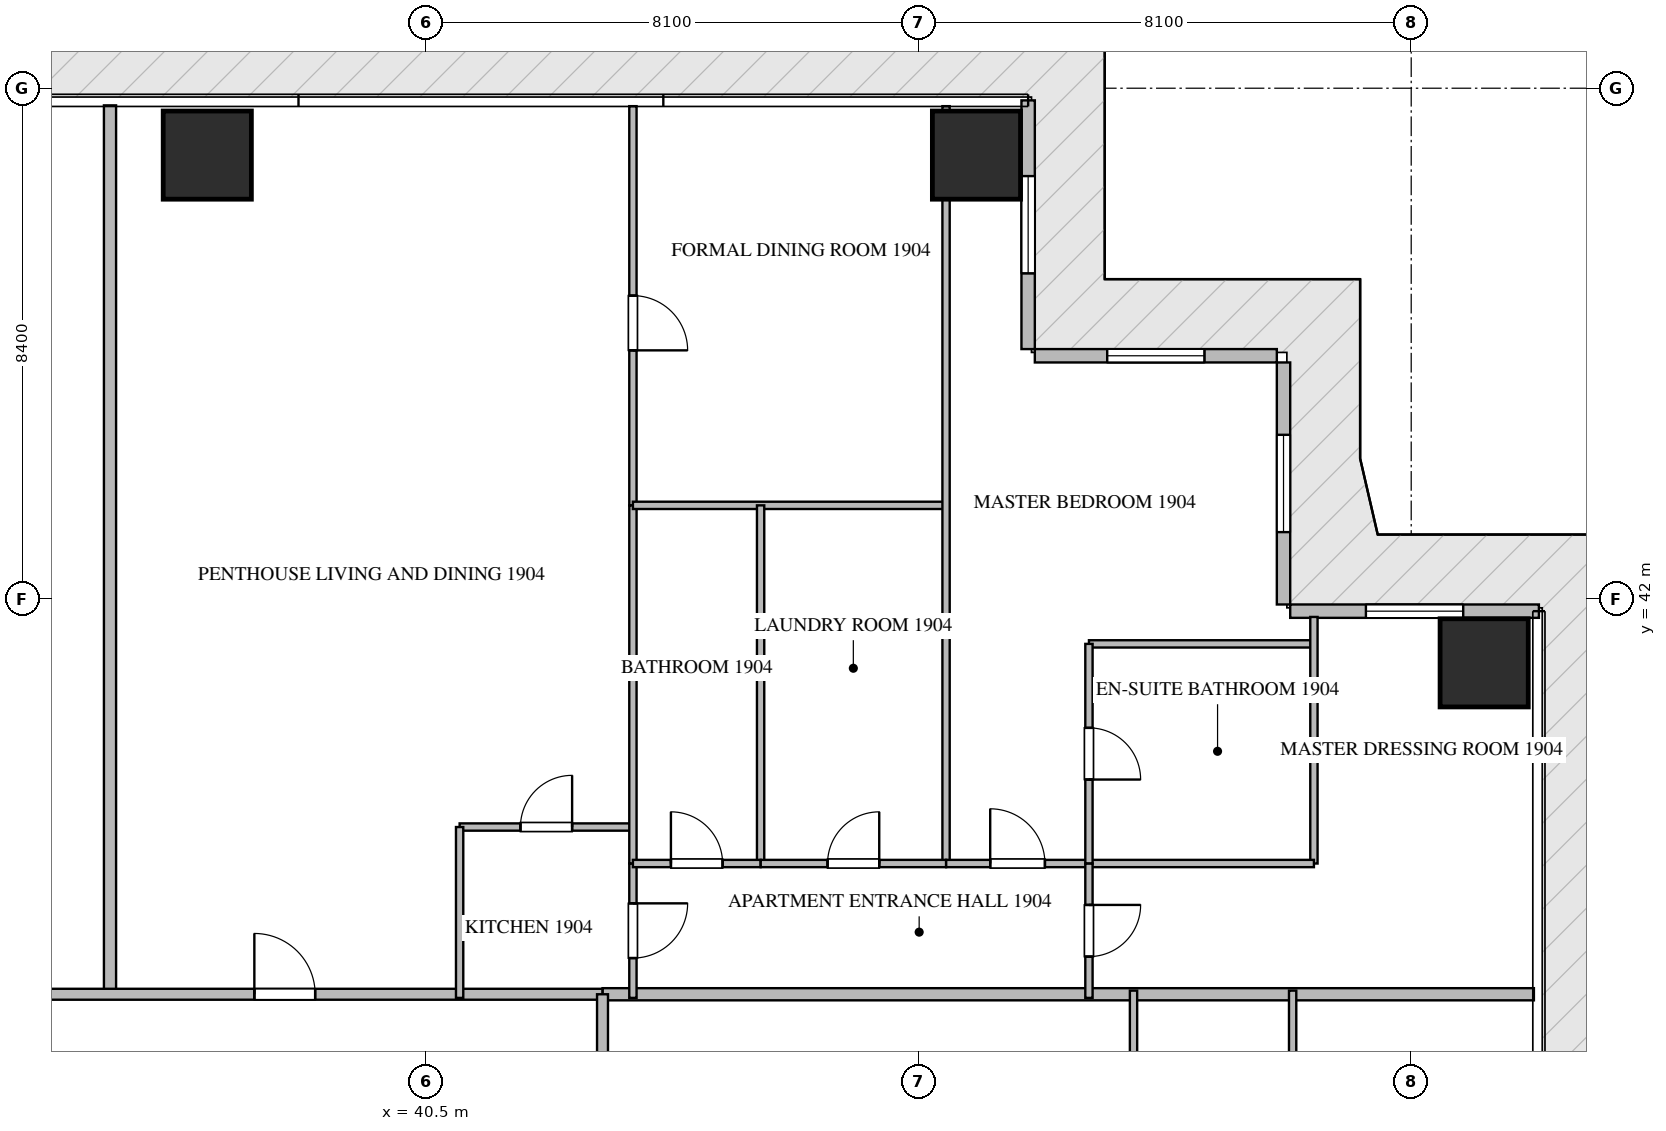
"""IFC4 building model, lengths in metres.
Left out: names, types, materials, properties, quantities, classifications, styles, units other than length and angle.
Written with IfcOpenShell. Run it as: python <this file> out.ifc"""

import sys

from ifc_helpers import new_model, si_unit, direction, frame, frame_2d, origin, origin_2d, place, context, subcontext, project, spatial, rectangle, extrude, source, transform, mapped, element, fill, save


model = new_model("IFC4")
c1 = context("Model", 3, precision=1e-05, world=origin(), true_north=direction((0.0, 1.0)))
c2 = subcontext(c1, "Body", "Model", "MODEL_VIEW")
j1 = project(units=[si_unit("LENGTHUNIT", "METRE"), si_unit("PLANEANGLEUNIT", "RADIAN")], contexts=[c1])
p1 = place(None, origin())
s1 = spatial("IfcSite", under=j1, at=p1, CompositionType="ELEMENT")
p2 = place(p1, origin())
s2 = spatial("IfcBuilding", under=s1, at=p2, CompositionType="ELEMENT")
p3 = place(p2, frame((0.0, 0.0, 79.2)))
s3 = spatial("IfcBuildingStorey", under=s2, at=p3, CompositionType="ELEMENT", Elevation=79.2)
m1 = source(origin(), c2, "Body", "SweptSolid", [
    extrude(rectangle(XDim=1.45, YDim=1.45, at=origin_2d()), origin(), (0.0, 0.0, 1.0), 3.75),
])
for number, where, z_axis, x_axis in (
    (1, (36.9, 49.3, -0.26), (0.0, 0.0, 1.0), (1.0, 0.0, 0.0)),
    (2, (49.55, 49.3, -0.26), (0.0, 0.0, 1.0), (1.0, 0.0, 0.0)),
    (3, (57.9, 40.95, -0.26), (0.0, 0.0, 1.0), (1.0, 0.0, 0.0)),
):
    element("IfcColumn", number, at=place(p3, frame(where, z_axis=z_axis, x_axis=x_axis)), inside=s3, PredefinedType="COLUMN", context=c2, shape_type="MappedRepresentation", body=[
        mapped(m1, transform((0.0, 0.0, 0.0), scale=1.0)),
    ])
p4 = place(p3, frame((58.8, 41.8, 0.0), z_axis=(0.0, 0.0, 1.0), x_axis=(-1.0, 0.0, 0.0)))
e4 = element("IfcWall", 4, at=p4, inside=s3, PredefinedType="ELEMENTEDWALL", context=c2, shape_type="SweptSolid", body=[
    extrude(rectangle(XDim=4.09, YDim=0.22, at=frame_2d((2.045, 0.0))), origin(), (0.0, 0.0, 1.0), 3.475),
])
p5 = place(p4, frame((1.245, 0.0, 0.65)))
e5 = element("IfcOpeningElement", 5, at=p5, cuts=e4, PredefinedType="OPENING", context=c2, shape_type="SweptSolid", body=[
    extrude(rectangle(XDim=1.6, YDim=2.1, at=frame_2d((0.8, 1.05))), frame((0.0, 0.12, 0.0), z_axis=(0.0, -1.0, 0.0), x_axis=(1.0, 0.0, 0.0)), (0.0, 0.0, 1.0), 0.24),
])
p6 = place(p3, frame((54.6, 41.91, 0.0), z_axis=(0.0, 0.0, 1.0), x_axis=(0.0, 1.0, 0.0)))
e6 = element("IfcWall", 6, at=p6, inside=s3, PredefinedType="ELEMENTEDWALL", context=c2, shape_type="SweptSolid", body=[
    extrude(rectangle(XDim=3.98, YDim=0.22, at=frame_2d((1.99, 0.0))), origin(), (0.0, 0.0, 1.0), 3.475),
])
p7 = place(p6, frame((1.19, 0.0, 0.65)))
e7 = element("IfcOpeningElement", 7, at=p7, cuts=e6, PredefinedType="OPENING", context=c2, shape_type="SweptSolid", body=[
    extrude(rectangle(XDim=1.6, YDim=2.1, at=frame_2d((0.8, 1.05))), frame((0.0, 0.12, 0.0), z_axis=(0.0, -1.0, 0.0), x_axis=(1.0, 0.0, 0.0)), (0.0, 0.0, 1.0), 0.24),
])
p8 = place(p3, frame((54.49, 46.0, 0.0), z_axis=(0.0, 0.0, 1.0), x_axis=(-1.0, 0.0, 0.0)))
e8 = element("IfcWall", 8, at=p8, inside=s3, PredefinedType="ELEMENTEDWALL", context=c2, shape_type="SweptSolid", body=[
    extrude(rectangle(XDim=3.98, YDim=0.22, at=frame_2d((1.99, 0.0))), origin(), (0.0, 0.0, 1.0), 3.475),
])
p9 = place(p8, frame((1.19, 0.0, 0.65)))
e9 = element("IfcOpeningElement", 9, at=p9, cuts=e8, PredefinedType="OPENING", context=c2, shape_type="SweptSolid", body=[
    extrude(rectangle(XDim=1.6, YDim=2.1, at=frame_2d((0.8, 1.05))), frame((0.0, 0.12, 0.0), z_axis=(0.0, -1.0, 0.0), x_axis=(1.0, 0.0, 0.0)), (0.0, 0.0, 1.0), 0.24),
])
p10 = place(p3, frame((50.4, 46.11, 0.0), z_axis=(0.0, 0.0, 1.0), x_axis=(0.0, 1.0, 0.0)))
e10 = element("IfcWall", 10, at=p10, inside=s3, PredefinedType="ELEMENTEDWALL", context=c2, shape_type="SweptSolid", body=[
    extrude(rectangle(XDim=4.09, YDim=0.22, at=frame_2d((2.045, 0.0))), origin(), (0.0, 0.0, 1.0), 3.475),
])
p11 = place(p10, frame((1.245, 0.0, 0.65)))
e11 = element("IfcOpeningElement", 11, at=p11, cuts=e10, PredefinedType="OPENING", context=c2, shape_type="SweptSolid", body=[
    extrude(rectangle(XDim=1.6, YDim=2.1, at=frame_2d((0.8, 1.05))), frame((0.0, 0.12, 0.0), z_axis=(0.0, -1.0, 0.0), x_axis=(1.0, 0.0, 0.0)), (0.0, 0.0, 1.0), 0.24),
])
p12 = place(p3, frame((35.3, 35.5, 0.0), z_axis=(0.0, 0.0, 1.0), x_axis=(0.0, 1.0, 0.0)))
e12 = element("IfcWall", 12, at=p12, inside=s3, PredefinedType="PARTITIONING", context=c2, shape_type="SweptSolid", body=[
    extrude(rectangle(XDim=14.618, YDim=0.2, at=frame_2d((7.309, 0.0))), origin(), (0.0, 0.0, 1.0), 3.49),
])
p13 = place(p3, frame((43.4, 35.5, 0.0), z_axis=(0.0, 0.0, 1.0), x_axis=(1.0, 0.0, 0.0)))
e13 = element("IfcWall", 13, at=p13, inside=s3, PredefinedType="PARTITIONING", context=c2, shape_type="SweptSolid", body=[
    extrude(rectangle(XDim=15.318, YDim=0.2, at=frame_2d((7.659, 0.0))), origin(), (0.0, 0.0, 1.0), 3.49),
])
p14 = place(p3, frame((21.402, 35.5, 0.0), z_axis=(0.0, 0.0, 1.0), x_axis=(1.0, 0.0, 0.0)))
e14 = element("IfcWall", 14, at=p14, inside=s3, PredefinedType="PARTITIONING", context=c2, shape_type="SweptSolid", body=[
    extrude(rectangle(XDim=21.996, YDim=0.18, at=frame_2d((10.998, 0.0))), origin(), (0.0, 0.0, 1.0), 3.49),
])
p15 = place(p14, frame((10.498, 0.0, 0.0)))
e15 = element("IfcOpeningElement", 15, at=p15, cuts=e14, PredefinedType="OPENING", context=c2, shape_type="SweptSolid", body=[
    extrude(rectangle(XDim=1.0, YDim=2.15, at=frame_2d((0.5, 1.075))), frame((0.0, 0.1, 0.0), z_axis=(0.0, -1.0, 0.0), x_axis=(1.0, 0.0, 0.0)), (0.0, 0.0, 1.0), 0.2),
])
p16 = place(p14, frame((16.272, 0.0, 0.0)))
e16 = element("IfcOpeningElement", 16, at=p16, cuts=e14, PredefinedType="OPENING", context=c2, shape_type="SweptSolid", body=[
    extrude(rectangle(XDim=1.0, YDim=2.15, at=frame_2d((0.5, 1.075))), frame((0.0, 0.1, 0.0), z_axis=(0.0, -1.0, 0.0), x_axis=(1.0, 0.0, 0.0)), (0.0, 0.0, 1.0), 0.2),
])
p17 = place(p3, frame((43.4, 14.9, 0.0), z_axis=(0.0, 0.0, 1.0), x_axis=(0.0, 1.0, 0.0)))
e17 = element("IfcWall", 17, at=p17, inside=s3, PredefinedType="PARTITIONING", context=c2, shape_type="SweptSolid", body=[
    extrude(rectangle(XDim=20.6, YDim=0.18, at=frame_2d((10.3, 0.0))), origin(), (0.0, 0.0, 1.0), 3.49),
])
p18 = place(p17, frame((1.96, 0.0, 0.0)))
e18 = element("IfcOpeningElement", 18, at=p18, cuts=e17, PredefinedType="OPENING", context=c2, shape_type="SweptSolid", body=[
    extrude(rectangle(XDim=1.0, YDim=2.15, at=frame_2d((0.5, 1.075))), frame((0.0, 0.1, 0.0), z_axis=(0.0, -1.0, 0.0), x_axis=(1.0, 0.0, 0.0)), (0.0, 0.0, 1.0), 0.2),
])
p19 = place(p3, frame((41.05, 38.25, 0.0), z_axis=(0.0, 0.0, 1.0), x_axis=(1.0, 0.0, 0.0)))
e19 = element("IfcWall", 19, at=p19, inside=s3, PredefinedType="PARTITIONING", context=c2, shape_type="SweptSolid", body=[
    extrude(rectangle(XDim=2.85, YDim=0.12, at=frame_2d((1.425, 0.0))), origin(), (0.0, 0.0, 1.0), 3.49),
])
p20 = place(p19, frame((1.0, 0.0, 0.0)))
e20 = element("IfcOpeningElement", 20, at=p20, cuts=e19, PredefinedType="OPENING", context=c2, shape_type="SweptSolid", body=[
    extrude(rectangle(XDim=0.85, YDim=2.1, at=frame_2d((0.425, 1.05))), frame((0.0, 0.07, 0.0), z_axis=(0.0, -1.0, 0.0), x_axis=(1.0, 0.0, 0.0)), (0.0, 0.0, 1.0), 0.14),
])
p21 = place(p3, frame((41.05, 38.25, 0.0), z_axis=(0.0, 0.0, 1.0), x_axis=(0.0, -1.0, 0.0)))
e21 = element("IfcWall", 21, at=p21, inside=s3, PredefinedType="PARTITIONING", context=c2, shape_type="SweptSolid", body=[
    extrude(rectangle(XDim=2.81, YDim=0.12, at=frame_2d((1.405, 0.0))), origin(), (0.0, 0.0, 1.0), 3.49),
])
p22 = place(p3, frame((43.9, 37.65, 0.0), z_axis=(0.0, 0.0, 1.0), x_axis=(0.0, -1.0, 0.0)))
e22 = element("IfcWall", 22, at=p22, inside=s3, PredefinedType="PARTITIONING", context=c2, shape_type="SweptSolid", body=[
    extrude(rectangle(XDim=2.21, YDim=0.12, at=frame_2d((1.105, 0.0))), origin(), (0.0, 0.0, 1.0), 3.49),
])
p23 = place(p22, frame((0.655, 0.0, 0.0)))
e23 = element("IfcOpeningElement", 23, at=p23, cuts=e22, PredefinedType="OPENING", context=c2, shape_type="SweptSolid", body=[
    extrude(rectangle(XDim=0.9, YDim=2.1, at=frame_2d((0.45, 1.05))), frame((0.0, 0.07, 0.0), z_axis=(0.0, -1.0, 0.0), x_axis=(1.0, 0.0, 0.0)), (0.0, 0.0, 1.0), 0.14),
])
p24 = place(p3, frame((43.9, 50.105, 0.0), z_axis=(0.0, 0.0, 1.0), x_axis=(0.0, -1.0, 0.0)))
e24 = element("IfcWall", 24, at=p24, inside=s3, PredefinedType="PARTITIONING", context=c2, shape_type="SweptSolid", body=[
    extrude(rectangle(XDim=6.565, YDim=0.12, at=frame_2d((3.282, 0.0))), origin(), (0.0, 0.0, 1.0), 3.49),
])
p25 = place(p24, frame((3.116, 0.0, 0.0)))
e25 = element("IfcOpeningElement", 25, at=p25, cuts=e24, PredefinedType="OPENING", context=c2, shape_type="SweptSolid", body=[
    extrude(rectangle(XDim=0.9, YDim=2.1, at=frame_2d((0.45, 1.05))), frame((0.0, 0.07, 0.0), z_axis=(0.0, -1.0, 0.0), x_axis=(1.0, 0.0, 0.0)), (0.0, 0.0, 1.0), 0.14),
])
p26 = place(p3, frame((43.9, 43.538, 0.0), z_axis=(0.0, 0.0, 1.0), x_axis=(0.0, -1.0, 0.0)))
e26 = element("IfcWall", 26, at=p26, inside=s3, PredefinedType="PARTITIONING", context=c2, shape_type="SweptSolid", body=[
    extrude(rectangle(XDim=5.886, YDim=0.12, at=frame_2d((2.943, 0.0))), origin(), (0.0, 0.0, 1.0), 3.49),
])
p27 = place(p3, frame((43.9, 43.54, 0.0), z_axis=(0.0, 0.0, 1.0), x_axis=(1.0, 0.0, 0.0)))
e27 = element("IfcWall", 27, at=p27, inside=s3, PredefinedType="PARTITIONING", context=c2, shape_type="SweptSolid", body=[
    extrude(rectangle(XDim=5.15, YDim=0.12, at=frame_2d((2.575, 0.0))), origin(), (0.0, 0.0, 1.0), 3.49),
])
p28 = place(p3, frame((49.05, 50.105, 0.0), z_axis=(0.0, 0.0, 1.0), x_axis=(0.0, -1.0, 0.0)))
e28 = element("IfcWall", 28, at=p28, inside=s3, PredefinedType="PARTITIONING", context=c2, shape_type="SweptSolid", body=[
    extrude(rectangle(XDim=12.455, YDim=0.12, at=frame_2d((6.228, 0.0))), origin(), (0.0, 0.0, 1.0), 3.49),
])
p29 = place(p3, frame((46.0, 43.54, 0.0), z_axis=(0.0, 0.0, 1.0), x_axis=(0.0, -1.0, 0.0)))
e29 = element("IfcWall", 29, at=p29, inside=s3, PredefinedType="PARTITIONING", context=c2, shape_type="SweptSolid", body=[
    extrude(rectangle(XDim=5.89, YDim=0.12, at=frame_2d((2.945, 0.0))), origin(), (0.0, 0.0, 1.0), 3.49),
])
p30 = place(p3, frame((43.9, 37.65, 0.0), z_axis=(0.0, 0.0, 1.0), x_axis=(1.0, 0.0, 0.0)))
e30 = element("IfcWall", 30, at=p30, inside=s3, PredefinedType="PARTITIONING", context=c2, shape_type="SweptSolid", body=[
    extrude(rectangle(XDim=2.1, YDim=0.12, at=frame_2d((1.05, 0.0))), origin(), (0.0, 0.0, 1.0), 3.49),
])
p31 = place(p30, frame((0.625, 0.0, 0.0)))
e31 = element("IfcOpeningElement", 31, at=p31, cuts=e30, PredefinedType="OPENING", context=c2, shape_type="SweptSolid", body=[
    extrude(rectangle(XDim=0.85, YDim=2.1, at=frame_2d((0.425, 1.05))), frame((0.0, 0.07, 0.0), z_axis=(0.0, -1.0, 0.0), x_axis=(1.0, 0.0, 0.0)), (0.0, 0.0, 1.0), 0.14),
])
p32 = place(p3, frame((46.002, 37.65, 0.0), z_axis=(0.0, 0.0, 1.0), x_axis=(1.0, 0.0, 0.0)))
e32 = element("IfcWall", 32, at=p32, inside=s3, PredefinedType="PARTITIONING", context=c2, shape_type="SweptSolid", body=[
    extrude(rectangle(XDim=3.048, YDim=0.12, at=frame_2d((1.524, 0.0))), origin(), (0.0, 0.0, 1.0), 3.49),
])
p33 = place(p32, frame((1.099, 0.0, 0.0)))
e33 = element("IfcOpeningElement", 33, at=p33, cuts=e32, PredefinedType="OPENING", context=c2, shape_type="SweptSolid", body=[
    extrude(rectangle(XDim=0.85, YDim=2.1, at=frame_2d((0.425, 1.05))), frame((0.0, 0.07, 0.0), z_axis=(0.0, -1.0, 0.0), x_axis=(1.0, 0.0, 0.0)), (0.0, 0.0, 1.0), 0.14),
])
p34 = place(p3, frame((49.052, 37.65, 0.0), z_axis=(0.0, 0.0, 1.0), x_axis=(1.0, 0.0, 0.0)))
e34 = element("IfcWall", 34, at=p34, inside=s3, PredefinedType="PARTITIONING", context=c2, shape_type="SweptSolid", body=[
    extrude(rectangle(XDim=2.348, YDim=0.12, at=frame_2d((1.174, 0.0))), origin(), (0.0, 0.0, 1.0), 3.49),
])
p35 = place(p34, frame((0.724, 0.0, 0.0)))
e35 = element("IfcOpeningElement", 35, at=p35, cuts=e34, PredefinedType="OPENING", context=c2, shape_type="SweptSolid", body=[
    extrude(rectangle(XDim=0.9, YDim=2.1, at=frame_2d((0.45, 1.05))), frame((0.0, 0.07, 0.0), z_axis=(0.0, -1.0, 0.0), x_axis=(1.0, 0.0, 0.0)), (0.0, 0.0, 1.0), 0.14),
])
p36 = place(p3, frame((51.4, 41.262, 0.0), z_axis=(0.0, 0.0, 1.0), x_axis=(1.0, 0.0, 0.0)))
e36 = element("IfcWall", 36, at=p36, inside=s3, PredefinedType="PARTITIONING", context=c2, shape_type="SweptSolid", body=[
    extrude(rectangle(XDim=3.7, YDim=0.12, at=frame_2d((1.85, 0.0))), origin(), (0.0, 0.0, 1.0), 3.49),
])
p37 = place(p3, frame((55.1, 41.705, 0.0), z_axis=(0.0, 0.0, 1.0), x_axis=(0.0, -1.0, 0.0)))
e37 = element("IfcWall", 37, at=p37, inside=s3, PredefinedType="PARTITIONING", context=c2, shape_type="SweptSolid", body=[
    extrude(rectangle(XDim=4.055, YDim=0.12, at=frame_2d((2.028, 0.0))), origin(), (0.0, 0.0, 1.0), 3.49),
])
p38 = place(p3, frame((51.402, 37.65, 0.0), z_axis=(0.0, 0.0, 1.0), x_axis=(1.0, 0.0, 0.0)))
e38 = element("IfcWall", 38, at=p38, inside=s3, PredefinedType="PARTITIONING", context=c2, shape_type="SweptSolid", body=[
    extrude(rectangle(XDim=3.698, YDim=0.12, at=frame_2d((1.849, 0.0))), origin(), (0.0, 0.0, 1.0), 3.49),
])
p39 = place(p3, frame((51.4, 41.262, 0.0), z_axis=(0.0, 0.0, 1.0), x_axis=(0.0, -1.0, 0.0)))
e39 = element("IfcWall", 39, at=p39, inside=s3, PredefinedType="PARTITIONING", context=c2, shape_type="SweptSolid", body=[
    extrude(rectangle(XDim=3.612, YDim=0.12, at=frame_2d((1.806, 0.0))), origin(), (0.0, 0.0, 1.0), 3.49),
])
p40 = place(p39, frame((1.381, 0.0, 0.0)))
e40 = element("IfcOpeningElement", 40, at=p40, cuts=e39, PredefinedType="OPENING", context=c2, shape_type="SweptSolid", body=[
    extrude(rectangle(XDim=0.85, YDim=2.1, at=frame_2d((0.425, 1.05))), frame((0.0, 0.07, 0.0), z_axis=(0.0, -1.0, 0.0), x_axis=(1.0, 0.0, 0.0)), (0.0, 0.0, 1.0), 0.14),
])
p41 = place(p3, frame((51.4, 37.648, 0.0), z_axis=(0.0, 0.0, 1.0), x_axis=(0.0, -1.0, 0.0)))
e41 = element("IfcWall", 41, at=p41, inside=s3, PredefinedType="PARTITIONING", context=c2, shape_type="SweptSolid", body=[
    extrude(rectangle(XDim=2.208, YDim=0.12, at=frame_2d((1.104, 0.0))), origin(), (0.0, 0.0, 1.0), 3.49),
])
p42 = place(p41, frame((0.679, 0.0, 0.0)))
e42 = element("IfcOpeningElement", 42, at=p42, cuts=e41, PredefinedType="OPENING", context=c2, shape_type="SweptSolid", body=[
    extrude(rectangle(XDim=0.85, YDim=2.1, at=frame_2d((0.425, 1.05))), frame((0.0, 0.07, 0.0), z_axis=(0.0, -1.0, 0.0), x_axis=(1.0, 0.0, 0.0)), (0.0, 0.0, 1.0), 0.14),
])
for number, where, z_axis, x_axis in (
    (43, (54.75, 30.15, 0.0), (0.0, 0.0, 1.0), (0.0, 1.0, 0.0)),
    (44, (52.133, 30.15, 0.0), (0.0, 0.0, 1.0), (0.0, 1.0, 0.0)),
):
    element("IfcWall", number, at=place(p3, frame(where, z_axis=z_axis, x_axis=x_axis)), inside=s3, PredefinedType="PARTITIONING", context=c2, shape_type="SweptSolid", body=[
        extrude(rectangle(XDim=5.41, YDim=0.12, at=frame_2d((2.705, 0.0))), origin(), (0.0, 0.0, 1.0), 3.49),
    ])
m2 = source(origin(), c2, "Body", "SweptSolid", [
    extrude(rectangle(XDim=1.6, YDim=2.1, at=frame_2d((0.8, 1.05))), frame((0.0, 0.03, 0.0), z_axis=(0.0, -1.0, 0.0), x_axis=(1.0, 0.0, 0.0)), (0.0, 0.0, 1.0), 0.06),
])
p43 = place(p5, origin())
e45 = element("IfcWindow", 45, at=p43, inside=s3, PartitioningType="SINGLE_PANEL", PredefinedType="WINDOW", context=c2, shape_type="MappedRepresentation", body=[
    mapped(m2, transform((0.0, 0.0, 0.0), scale=1.0)),
])
fill(e5, e45)
p44 = place(p7, origin())
e46 = element("IfcWindow", 46, at=p44, inside=s3, PartitioningType="SINGLE_PANEL", PredefinedType="WINDOW", context=c2, shape_type="MappedRepresentation", body=[
    mapped(m2, transform((0.0, 0.0, 0.0), scale=1.0)),
])
fill(e7, e46)
p45 = place(p9, origin())
e47 = element("IfcWindow", 47, at=p45, inside=s3, PartitioningType="SINGLE_PANEL", PredefinedType="WINDOW", context=c2, shape_type="MappedRepresentation", body=[
    mapped(m2, transform((0.0, 0.0, 0.0), scale=1.0)),
])
fill(e9, e47)
p46 = place(p11, origin())
e48 = element("IfcWindow", 48, at=p46, inside=s3, PartitioningType="SINGLE_PANEL", PredefinedType="WINDOW", context=c2, shape_type="MappedRepresentation", body=[
    mapped(m2, transform((0.0, 0.0, 0.0), scale=1.0)),
])
fill(e11, e48)
m3 = source(origin(), c2, "Body", "SweptSolid", [
    extrude(rectangle(XDim=1.0, YDim=2.15, at=frame_2d((0.5, 1.075))), frame((0.0, 0.025, 0.0), z_axis=(0.0, -1.0, 0.0), x_axis=(1.0, 0.0, 0.0)), (0.0, 0.0, 1.0), 0.05),
])
p47 = place(p16, origin())
e49 = element("IfcDoor", 49, at=p47, inside=s3, OperationType="SINGLE_SWING_LEFT", PredefinedType="DOOR", context=c2, shape_type="MappedRepresentation", body=[
    mapped(m3, transform((0.0, 0.0, 0.0), scale=1.0)),
])
fill(e16, e49)
m4 = source(origin(), c2, "Body", "SweptSolid", [
    extrude(rectangle(XDim=0.85, YDim=2.1, at=frame_2d((0.425, 1.05))), frame((0.0, 0.025, 0.0), z_axis=(0.0, -1.0, 0.0), x_axis=(1.0, 0.0, 0.0)), (0.0, 0.0, 1.0), 0.05),
])
p48 = place(p20, origin())
e50 = element("IfcDoor", 50, at=p48, inside=s3, OperationType="SINGLE_SWING_RIGHT", PredefinedType="DOOR", context=c2, shape_type="MappedRepresentation", body=[
    mapped(m4, transform((0.0, 0.0, 0.0), scale=1.0)),
])
fill(e20, e50)
m5 = source(origin(), c2, "Body", "SweptSolid", [
    extrude(rectangle(XDim=0.9, YDim=2.1, at=frame_2d((0.45, 1.05))), frame((0.0, 0.025, 0.0), z_axis=(0.0, -1.0, 0.0), x_axis=(1.0, 0.0, 0.0)), (0.0, 0.0, 1.0), 0.05),
])
p49 = place(p23, origin())
e51 = element("IfcDoor", 51, at=p49, inside=s3, OperationType="SINGLE_SWING_LEFT", PredefinedType="DOOR", context=c2, shape_type="MappedRepresentation", body=[
    mapped(m5, transform((0.0, 0.0, 0.0), scale=1.0)),
])
fill(e23, e51)
p50 = place(p25, origin())
e52 = element("IfcDoor", 52, at=p50, inside=s3, OperationType="SINGLE_SWING_RIGHT", PredefinedType="DOOR", context=c2, shape_type="MappedRepresentation", body=[
    mapped(m5, transform((0.0, 0.0, 0.0), scale=1.0)),
])
fill(e25, e52)
p51 = place(p31, origin())
e53 = element("IfcDoor", 53, at=p51, inside=s3, OperationType="SINGLE_SWING_LEFT", PredefinedType="DOOR", context=c2, shape_type="MappedRepresentation", body=[
    mapped(m4, transform((0.0, 0.0, 0.0), scale=1.0)),
])
fill(e31, e53)
p52 = place(p33, origin())
e54 = element("IfcDoor", 54, at=p52, inside=s3, OperationType="SINGLE_SWING_RIGHT", PredefinedType="DOOR", context=c2, shape_type="MappedRepresentation", body=[
    mapped(m4, transform((0.0, 0.0, 0.0), scale=1.0)),
])
fill(e33, e54)
p53 = place(p35, origin())
e55 = element("IfcDoor", 55, at=p53, inside=s3, OperationType="SINGLE_SWING_LEFT", PredefinedType="DOOR", context=c2, shape_type="MappedRepresentation", body=[
    mapped(m5, transform((0.0, 0.0, 0.0), scale=1.0)),
])
fill(e35, e55)
p54 = place(p40, origin())
e56 = element("IfcDoor", 56, at=p54, inside=s3, OperationType="SINGLE_SWING_RIGHT", PredefinedType="DOOR", context=c2, shape_type="MappedRepresentation", body=[
    mapped(m4, transform((0.0, 0.0, 0.0), scale=1.0)),
])
fill(e40, e56)
p55 = place(p42, origin())
e57 = element("IfcDoor", 57, at=p55, inside=s3, OperationType="SINGLE_SWING_LEFT", PredefinedType="DOOR", context=c2, shape_type="MappedRepresentation", body=[
    mapped(m4, transform((0.0, 0.0, 0.0), scale=1.0)),
])
fill(e42, e57)
save(model, sys.argv[1])
